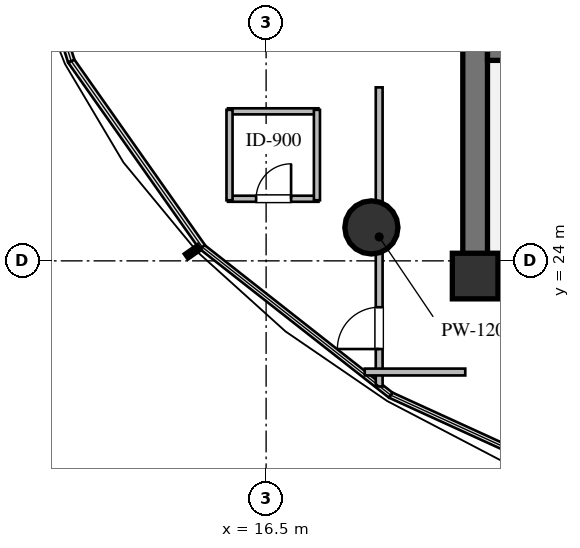
"""IFC4 building model, lengths in metres.
Left out: names, types, materials, properties, quantities, classifications, styles, units other than length and angle.
Written with IfcOpenShell. Run it as: python <this file> out.ifc"""

import sys

from ifc_helpers import new_model, si_unit, direction, frame, frame_2d, origin, origin_2d, place, context, subcontext, project, spatial, rectangle, circle, extrude, element, fill, save


model = new_model("IFC4")
c1 = context("Model", 3, precision=1e-05, world=origin(), true_north=direction((0.0, 1.0)))
c2 = subcontext(c1, "Body", "Model", "MODEL_VIEW")
j1 = project(units=[si_unit("LENGTHUNIT", "METRE"), si_unit("PLANEANGLEUNIT", "RADIAN")], contexts=[c1])
p1 = place(None, origin())
s1 = spatial("IfcSite", under=j1, at=p1, CompositionType="ELEMENT")
p2 = place(p1, origin())
s2 = spatial("IfcBuilding", under=s1, at=p2, CompositionType="ELEMENT")
p3 = place(p2, frame((0.0, 0.0, 42.0)))
s3 = spatial("IfcBuildingStorey", under=s2, at=p3, CompositionType="ELEMENT", Elevation=42.0)
p4 = place(p3, frame((21.675, 23.6, 0.0), z_axis=(0.0, 0.0, 1.0), x_axis=(1.0, 0.0, 0.0)))
e1 = element("IfcWall", 1, at=p4, inside=s3, PredefinedType="SHEAR", context=c2, shape_type="SweptSolid", body=[
    extrude(rectangle(XDim=22.65, YDim=0.65, at=frame_2d((11.325, 0.0))), origin(), (0.0, 0.0, 1.0), 3.36),
])
p5 = place(p3, frame((22.0, 23.925, 0.0), z_axis=(0.0, 0.0, 1.0), x_axis=(0.0, 1.0, 0.0)))
e2 = element("IfcWall", 2, at=p5, inside=s3, PredefinedType="SHEAR", context=c2, shape_type="SweptSolid", body=[
    extrude(rectangle(XDim=12.15, YDim=0.65, at=frame_2d((6.075, 0.0))), origin(), (0.0, 0.0, 1.0), 3.36),
])
p6 = place(p3, frame((22.325, 29.6, 0.0), z_axis=(0.0, 0.0, 1.0), x_axis=(1.0, 0.0, 0.0)))
e3 = element("IfcWall", 3, at=p6, inside=s3, PredefinedType="SHEAR", context=c2, shape_type="SweptSolid", body=[
    extrude(rectangle(XDim=21.35, YDim=0.65, at=frame_2d((10.675, 0.0))), origin(), (0.0, 0.0, 1.0), 3.36),
])
p7 = place(p6, frame((12.125, 0.0, 0.0)))
e4 = element("IfcOpeningElement", 4, at=p7, cuts=e3, PredefinedType="OPENING", context=c2, shape_type="SweptSolid", body=[
    extrude(rectangle(XDim=1.15, YDim=2.1, at=frame_2d((0.575, 1.05))), frame((0.0, 0.335, 0.0), z_axis=(0.0, -1.0, 0.0), x_axis=(1.0, 0.0, 0.0)), (0.0, 0.0, 1.0), 0.67),
])
p8 = place(p3, frame((22.0, 23.6, 0.0), z_axis=(0.0, 0.0, 1.0), x_axis=(1.0, 0.0, 0.0)))
e5 = element("IfcColumn", 5, at=p8, inside=s3, PredefinedType="COLUMN", context=c2, shape_type="SweptSolid", body=[
    extrude(rectangle(XDim=1.2, YDim=1.2, at=origin_2d()), origin(), (0.0, 0.0, 1.0), 3.6),
])
p9 = place(p3, frame((19.27, 24.88, 0.0), z_axis=(0.0, 0.0, 1.0), x_axis=(1.0, 0.0, 0.0)))
e6 = element("IfcColumn", 6, at=p9, inside=s3, PredefinedType="COLUMN", context=c2, shape_type="SweptSolid", body=[
    extrude(circle(Radius=0.7, at=origin_2d()), origin(), (0.0, 0.0, 1.0), 3.6),
])
p10 = place(p3, frame((15.497, 25.634, 0.0), z_axis=(0.0, 0.0, 1.0), x_axis=(1.0, 0.0, 0.0)))
e7 = element("IfcWall", 7, at=p10, inside=s3, PredefinedType="PLUMBINGWALL", context=c2, shape_type="SweptSolid", body=[
    extrude(rectangle(XDim=2.38, YDim=0.16, at=frame_2d((1.19, 0.0))), origin(), (0.0, 0.0, 1.0), 3.36),
])
p11 = place(p10, frame((0.74, 0.0, 0.0)))
e8 = element("IfcOpeningElement", 8, at=p11, cuts=e7, PredefinedType="OPENING", context=c2, shape_type="SweptSolid", body=[
    extrude(rectangle(XDim=0.92, YDim=2.1, at=frame_2d((0.46, 1.05))), frame((0.0, 0.09, 0.0), z_axis=(0.0, -1.0, 0.0), x_axis=(1.0, 0.0, 0.0)), (0.0, 0.0, 1.0), 0.18),
])
p12 = place(p3, frame((15.497, 27.934, 0.0), z_axis=(0.0, 0.0, 1.0), x_axis=(1.0, 0.0, 0.0)))
e9 = element("IfcWall", 9, at=p12, inside=s3, PredefinedType="PLUMBINGWALL", context=c2, shape_type="SweptSolid", body=[
    extrude(rectangle(XDim=2.38, YDim=0.16, at=frame_2d((1.19, 0.0))), origin(), (0.0, 0.0, 1.0), 3.36),
])
p13 = place(p3, frame((15.537, 25.594, 0.0), z_axis=(0.0, 0.0, 1.0), x_axis=(0.0, 1.0, 0.0)))
e10 = element("IfcWall", 10, at=p13, inside=s3, PredefinedType="PLUMBINGWALL", context=c2, shape_type="SweptSolid", body=[
    extrude(rectangle(XDim=2.38, YDim=0.16, at=frame_2d((1.19, 0.0))), origin(), (0.0, 0.0, 1.0), 3.36),
])
p14 = place(p3, frame((17.837, 25.594, 0.0), z_axis=(0.0, 0.0, 1.0), x_axis=(0.0, 1.0, 0.0)))
e11 = element("IfcWall", 11, at=p14, inside=s3, PredefinedType="PLUMBINGWALL", context=c2, shape_type="SweptSolid", body=[
    extrude(rectangle(XDim=2.38, YDim=0.16, at=frame_2d((1.19, 0.0))), origin(), (0.0, 0.0, 1.0), 2.738),
])
p15 = place(p3, frame((19.475, 20.695, 0.0), z_axis=(0.0, 0.0, 1.0), x_axis=(0.0, 1.0, 0.0)))
e12 = element("IfcWall", 12, at=p15, inside=s3, PredefinedType="PARTITIONING", context=c2, shape_type="SweptSolid", body=[
    extrude(rectangle(XDim=7.87, YDim=0.18, at=frame_2d((3.935, 0.0))), origin(), (0.0, 0.0, 1.0), 2.738),
])
p16 = place(p15, frame((0.985, 0.0, 0.0)))
e13 = element("IfcOpeningElement", 13, at=p16, cuts=e12, PredefinedType="OPENING", context=c2, shape_type="SweptSolid", body=[
    extrude(rectangle(XDim=1.1, YDim=2.1, at=frame_2d((0.55, 1.05))), frame((0.0, 0.1, 0.0), z_axis=(0.0, -1.0, 0.0), x_axis=(1.0, 0.0, 0.0)), (0.0, 0.0, 1.0), 0.2),
])
p17 = place(p3, frame((21.74, 21.075, 0.0), z_axis=(0.0, 0.0, 1.0), x_axis=(-1.0, 0.0, 0.0)))
e14 = element("IfcWall", 14, at=p17, inside=s3, PredefinedType="PARTITIONING", context=c2, shape_type="SweptSolid", body=[
    extrude(rectangle(XDim=2.645, YDim=0.18, at=frame_2d((1.323, 0.0))), origin(), (0.0, 0.0, 1.0), 3.36),
])
p18 = place(p11, origin())
e15 = element("IfcDoor", 15, at=p18, inside=s3, OperationType="SINGLE_SWING_RIGHT", PredefinedType="DOOR", context=c2, shape_type="SweptSolid", body=[
    extrude(rectangle(XDim=0.92, YDim=2.1, at=frame_2d((0.46, 1.05))), frame((0.0, 0.025, 0.0), z_axis=(0.0, -1.0, 0.0), x_axis=(1.0, 0.0, 0.0)), (0.0, 0.0, 1.0), 0.05),
])
fill(e8, e15)
p19 = place(p16, origin())
e16 = element("IfcDoor", 16, at=p19, inside=s3, OperationType="SINGLE_SWING_LEFT", PredefinedType="DOOR", context=c2, shape_type="SweptSolid", body=[
    extrude(rectangle(XDim=1.1, YDim=2.1, at=frame_2d((0.55, 1.05))), frame((0.0, 0.025, 0.0), z_axis=(0.0, -1.0, 0.0), x_axis=(1.0, 0.0, 0.0)), (0.0, 0.0, 1.0), 0.05),
])
fill(e13, e16)
save(model, sys.argv[1])
